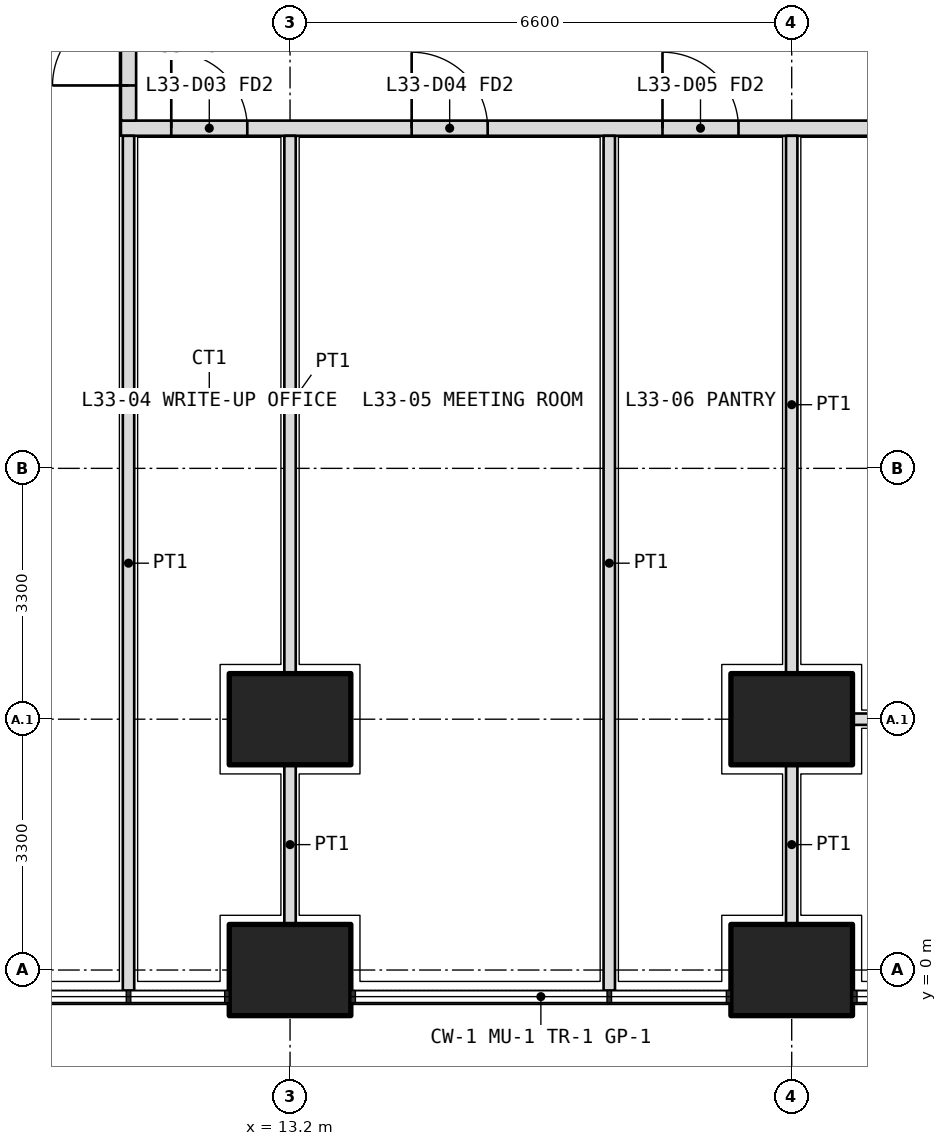
"""IFC4 building model, lengths in metres.
Left out: names, types, materials, properties, quantities, classifications, styles, units other than length and angle.
Written with IfcOpenShell. Run it as: python <this file> out.ifc"""

import sys

from ifc_helpers import new_model, si_unit, direction, frame, frame_2d, origin, origin_2d, place, context, subcontext, project, spatial, rectangle, extrude, element, fill, save


model = new_model("IFC4")
c1 = context("Model", 3, precision=1e-05, world=origin(), true_north=direction((0.0, 1.0)))
c2 = subcontext(c1, "Body", "Model", "MODEL_VIEW")
j1 = project(units=[si_unit("LENGTHUNIT", "METRE"), si_unit("PLANEANGLEUNIT", "RADIAN")], contexts=[c1])
p1 = place(None, origin())
s1 = spatial("IfcSite", under=j1, at=p1, CompositionType="ELEMENT")
p2 = place(p1, origin())
s2 = spatial("IfcBuilding", under=s1, at=p2, CompositionType="ELEMENT")
p3 = place(p2, frame((0.0, 0.0, 145.2)))
s3 = spatial("IfcBuildingStorey", under=s2, at=p3, CompositionType="ELEMENT", Elevation=145.2)
for number, where, z_axis, x_axis in (
    (1, (13.2, 0.0, 0.0), (0.0, 0.0, 1.0), (1.0, 0.0, 0.0)),
    (2, (19.8, 0.0, 0.0), (0.0, 0.0, 1.0), (1.0, 0.0, 0.0)),
    (3, (13.2, 3.3, 0.0), (0.0, 0.0, 1.0), (1.0, 0.0, 0.0)),
    (4, (19.8, 3.3, 0.0), (0.0, 0.0, 1.0), (1.0, 0.0, 0.0)),
):
    element("IfcColumn", number, at=place(p3, frame(where, z_axis=z_axis, x_axis=x_axis)), inside=s3, PredefinedType="COLUMN", context=c2, shape_type="SweptSolid", body=[
        extrude(rectangle(XDim=1.6, YDim=1.2, at=origin_2d()), origin(), (0.0, 0.0, 1.0), 4.2),
    ])
p4 = place(p3, frame((10.975, 11.075, 0.0), z_axis=(0.0, 0.0, 1.0), x_axis=(1.0, 0.0, 0.0)))
e5 = element("IfcWall", 5, at=p4, inside=s3, PredefinedType="PARTITIONING", context=c2, shape_type="SweptSolid", body=[
    extrude(rectangle(XDim=30.85, YDim=0.2, at=frame_2d((15.425, 0.0))), origin(), (0.0, 0.0, 1.0), 2.55),
])
p5 = place(p4, frame((0.663, 0.0, 0.0)))
e6 = element("IfcOpeningElement", 6, at=p5, cuts=e5, PredefinedType="OPENING", context=c2, shape_type="SweptSolid", body=[
    extrude(rectangle(XDim=1.0, YDim=2.1, at=frame_2d((0.5, 1.05))), frame((0.0, 0.11, 0.0), z_axis=(0.0, -1.0, 0.0), x_axis=(1.0, 0.0, 0.0)), (0.0, 0.0, 1.0), 0.22),
])
p6 = place(p4, frame((3.825, 0.0, 0.0)))
e7 = element("IfcOpeningElement", 7, at=p6, cuts=e5, PredefinedType="OPENING", context=c2, shape_type="SweptSolid", body=[
    extrude(rectangle(XDim=1.0, YDim=2.1, at=frame_2d((0.5, 1.05))), frame((0.0, 0.11, 0.0), z_axis=(0.0, -1.0, 0.0), x_axis=(1.0, 0.0, 0.0)), (0.0, 0.0, 1.0), 0.22),
])
p7 = place(p4, frame((7.125, 0.0, 0.0)))
e8 = element("IfcOpeningElement", 8, at=p7, cuts=e5, PredefinedType="OPENING", context=c2, shape_type="SweptSolid", body=[
    extrude(rectangle(XDim=1.0, YDim=2.1, at=frame_2d((0.5, 1.05))), frame((0.0, 0.11, 0.0), z_axis=(0.0, -1.0, 0.0), x_axis=(1.0, 0.0, 0.0)), (0.0, 0.0, 1.0), 0.22),
])
p8 = place(p4, frame((19.188, 0.0, 0.0)))
e9 = element("IfcOpeningElement", 9, at=p8, cuts=e5, PredefinedType="OPENING", context=c2, shape_type="SweptSolid", body=[
    extrude(rectangle(XDim=1.2, YDim=2.1, at=frame_2d((0.6, 1.05))), frame((0.0, 0.11, 0.0), z_axis=(0.0, -1.0, 0.0), x_axis=(1.0, 0.0, 0.0)), (0.0, 0.0, 1.0), 0.22),
])
p9 = place(p3, frame((11.075, 11.175, 0.0), z_axis=(0.0, 0.0, 1.0), x_axis=(0.0, 1.0, 0.0)))
e10 = element("IfcWall", 10, at=p9, inside=s3, PredefinedType="PARTITIONING", context=c2, shape_type="SweptSolid", body=[
    extrude(rectangle(XDim=27.625, YDim=0.2, at=frame_2d((13.812, 0.0))), origin(), (0.0, 0.0, 1.0), 2.55),
])
p10 = place(p9, frame((0.462, 0.0, 0.0)))
e11 = element("IfcOpeningElement", 11, at=p10, cuts=e10, PredefinedType="OPENING", context=c2, shape_type="SweptSolid", body=[
    extrude(rectangle(XDim=1.0, YDim=2.1, at=frame_2d((0.5, 1.05))), frame((0.0, 0.11, 0.0), z_axis=(0.0, -1.0, 0.0), x_axis=(1.0, 0.0, 0.0)), (0.0, 0.0, 1.0), 0.22),
])
p11 = place(p9, frame((2.575, 0.0, 0.0)))
e12 = element("IfcOpeningElement", 12, at=p11, cuts=e10, PredefinedType="OPENING", context=c2, shape_type="SweptSolid", body=[
    extrude(rectangle(XDim=1.0, YDim=2.1, at=frame_2d((0.5, 1.05))), frame((0.0, 0.11, 0.0), z_axis=(0.0, -1.0, 0.0), x_axis=(1.0, 0.0, 0.0)), (0.0, 0.0, 1.0), 0.22),
])
p12 = place(p9, frame((5.65, 0.0, 0.0)))
e13 = element("IfcOpeningElement", 13, at=p12, cuts=e10, PredefinedType="OPENING", context=c2, shape_type="SweptSolid", body=[
    extrude(rectangle(XDim=0.9, YDim=2.1, at=frame_2d((0.45, 1.05))), frame((0.0, 0.11, 0.0), z_axis=(0.0, -1.0, 0.0), x_axis=(1.0, 0.0, 0.0)), (0.0, 0.0, 1.0), 0.22),
])
p13 = place(p9, frame((9.5, 0.0, 0.0)))
e14 = element("IfcOpeningElement", 14, at=p13, cuts=e10, PredefinedType="OPENING", context=c2, shape_type="SweptSolid", body=[
    extrude(rectangle(XDim=0.9, YDim=2.1, at=frame_2d((0.45, 1.05))), frame((0.0, 0.11, 0.0), z_axis=(0.0, -1.0, 0.0), x_axis=(1.0, 0.0, 0.0)), (0.0, 0.0, 1.0), 0.22),
])
p14 = place(p9, frame((13.025, 0.0, 0.0)))
e15 = element("IfcOpeningElement", 15, at=p14, cuts=e10, PredefinedType="OPENING", context=c2, shape_type="SweptSolid", body=[
    extrude(rectangle(XDim=1.0, YDim=2.1, at=frame_2d((0.5, 1.05))), frame((0.0, 0.11, 0.0), z_axis=(0.0, -1.0, 0.0), x_axis=(1.0, 0.0, 0.0)), (0.0, 0.0, 1.0), 0.22),
])
p15 = place(p9, frame((18.025, 0.0, 0.0)))
e16 = element("IfcOpeningElement", 16, at=p15, cuts=e10, PredefinedType="OPENING", context=c2, shape_type="SweptSolid", body=[
    extrude(rectangle(XDim=1.0, YDim=2.1, at=frame_2d((0.5, 1.05))), frame((0.0, 0.11, 0.0), z_axis=(0.0, -1.0, 0.0), x_axis=(1.0, 0.0, 0.0)), (0.0, 0.0, 1.0), 0.22),
])
p16 = place(p9, frame((24.275, 0.0, 0.0)))
e17 = element("IfcOpeningElement", 17, at=p16, cuts=e10, PredefinedType="OPENING", context=c2, shape_type="SweptSolid", body=[
    extrude(rectangle(XDim=1.0, YDim=2.1, at=frame_2d((0.5, 1.05))), frame((0.0, 0.11, 0.0), z_axis=(0.0, -1.0, 0.0), x_axis=(1.0, 0.0, 0.0)), (0.0, 0.0, 1.0), 0.22),
])
p17 = place(p3, frame((11.075, -0.27, 0.0), z_axis=(0.0, 0.0, 1.0), x_axis=(0.0, 1.0, 0.0)))
e18 = element("IfcWall", 18, at=p17, inside=s3, PredefinedType="PARTITIONING", context=c2, shape_type="SweptSolid", body=[
    extrude(rectangle(XDim=11.245, YDim=0.15, at=frame_2d((5.623, 0.0))), origin(), (0.0, 0.0, 1.0), 3.85),
])
p18 = place(p3, frame((20.6, 3.3, 0.0), z_axis=(0.0, 0.0, 1.0), x_axis=(1.0, 0.0, 0.0)))
e19 = element("IfcWall", 19, at=p18, inside=s3, PredefinedType="PARTITIONING", context=c2, shape_type="SweptSolid", body=[
    extrude(rectangle(XDim=5.0, YDim=0.15, at=frame_2d((2.5, 0.0))), origin(), (0.0, 0.0, 1.0), 2.55),
])
p19 = place(p3, frame((17.4, -0.27, 0.0), z_axis=(0.0, 0.0, 1.0), x_axis=(0.0, 1.0, 0.0)))
e20 = element("IfcWall", 20, at=p19, inside=s3, PredefinedType="PARTITIONING", context=c2, shape_type="SweptSolid", body=[
    extrude(rectangle(XDim=11.245, YDim=0.15, at=frame_2d((5.623, 0.0))), origin(), (0.0, 0.0, 1.0), 3.85),
])
p20 = place(p3, frame((19.8, 0.6, 0.0), z_axis=(0.0, 0.0, 1.0), x_axis=(0.0, 1.0, 0.0)))
e21 = element("IfcWall", 21, at=p20, inside=s3, PredefinedType="PARTITIONING", context=c2, shape_type="SweptSolid", body=[
    extrude(rectangle(XDim=2.1, YDim=0.15, at=frame_2d((1.05, 0.0))), origin(), (0.0, 0.0, 1.0), 2.55),
])
p21 = place(p3, frame((19.8, 3.9, 0.0), z_axis=(0.0, 0.0, 1.0), x_axis=(0.0, 1.0, 0.0)))
e22 = element("IfcWall", 22, at=p21, inside=s3, PredefinedType="PARTITIONING", context=c2, shape_type="SweptSolid", body=[
    extrude(rectangle(XDim=7.075, YDim=0.15, at=frame_2d((3.538, 0.0))), origin(), (0.0, 0.0, 1.0), 2.55),
])
p22 = place(p3, frame((13.2, 0.6, 0.0), z_axis=(0.0, 0.0, 1.0), x_axis=(0.0, 1.0, 0.0)))
e23 = element("IfcWall", 23, at=p22, inside=s3, PredefinedType="PARTITIONING", context=c2, shape_type="SweptSolid", body=[
    extrude(rectangle(XDim=2.1, YDim=0.15, at=frame_2d((1.05, 0.0))), origin(), (0.0, 0.0, 1.0), 2.55),
])
p23 = place(p3, frame((13.2, 3.9, 0.0), z_axis=(0.0, 0.0, 1.0), x_axis=(0.0, 1.0, 0.0)))
e24 = element("IfcWall", 24, at=p23, inside=s3, PredefinedType="PARTITIONING", context=c2, shape_type="SweptSolid", body=[
    extrude(rectangle(XDim=7.075, YDim=0.15, at=frame_2d((3.538, 0.0))), origin(), (0.0, 0.0, 1.0), 2.55),
])
p24 = place(p5, origin())
e25 = element("IfcDoor", 25, at=p24, inside=s3, OperationType="SINGLE_SWING_LEFT", PredefinedType="DOOR", context=c2, shape_type="SweptSolid", body=[
    extrude(rectangle(XDim=1.0, YDim=2.1, at=frame_2d((0.5, 1.05))), frame((0.0, 0.025, 0.0), z_axis=(0.0, -1.0, 0.0), x_axis=(1.0, 0.0, 0.0)), (0.0, 0.0, 1.0), 0.05),
])
fill(e6, e25)
p25 = place(p6, origin())
e26 = element("IfcDoor", 26, at=p25, inside=s3, OperationType="SINGLE_SWING_LEFT", PredefinedType="DOOR", context=c2, shape_type="SweptSolid", body=[
    extrude(rectangle(XDim=1.0, YDim=2.1, at=frame_2d((0.5, 1.05))), frame((0.0, 0.025, 0.0), z_axis=(0.0, -1.0, 0.0), x_axis=(1.0, 0.0, 0.0)), (0.0, 0.0, 1.0), 0.05),
])
fill(e7, e26)
p26 = place(p7, origin())
e27 = element("IfcDoor", 27, at=p26, inside=s3, OperationType="SINGLE_SWING_LEFT", PredefinedType="DOOR", context=c2, shape_type="SweptSolid", body=[
    extrude(rectangle(XDim=1.0, YDim=2.1, at=frame_2d((0.5, 1.05))), frame((0.0, 0.025, 0.0), z_axis=(0.0, -1.0, 0.0), x_axis=(1.0, 0.0, 0.0)), (0.0, 0.0, 1.0), 0.05),
])
fill(e8, e27)
p27 = place(p10, origin())
e28 = element("IfcDoor", 28, at=p27, inside=s3, OperationType="SINGLE_SWING_LEFT", PredefinedType="DOOR", context=c2, shape_type="SweptSolid", body=[
    extrude(rectangle(XDim=1.0, YDim=2.1, at=frame_2d((0.5, 1.05))), frame((0.0, 0.025, 0.0), z_axis=(0.0, -1.0, 0.0), x_axis=(1.0, 0.0, 0.0)), (0.0, 0.0, 1.0), 0.05),
])
fill(e11, e28)
save(model, sys.argv[1])
